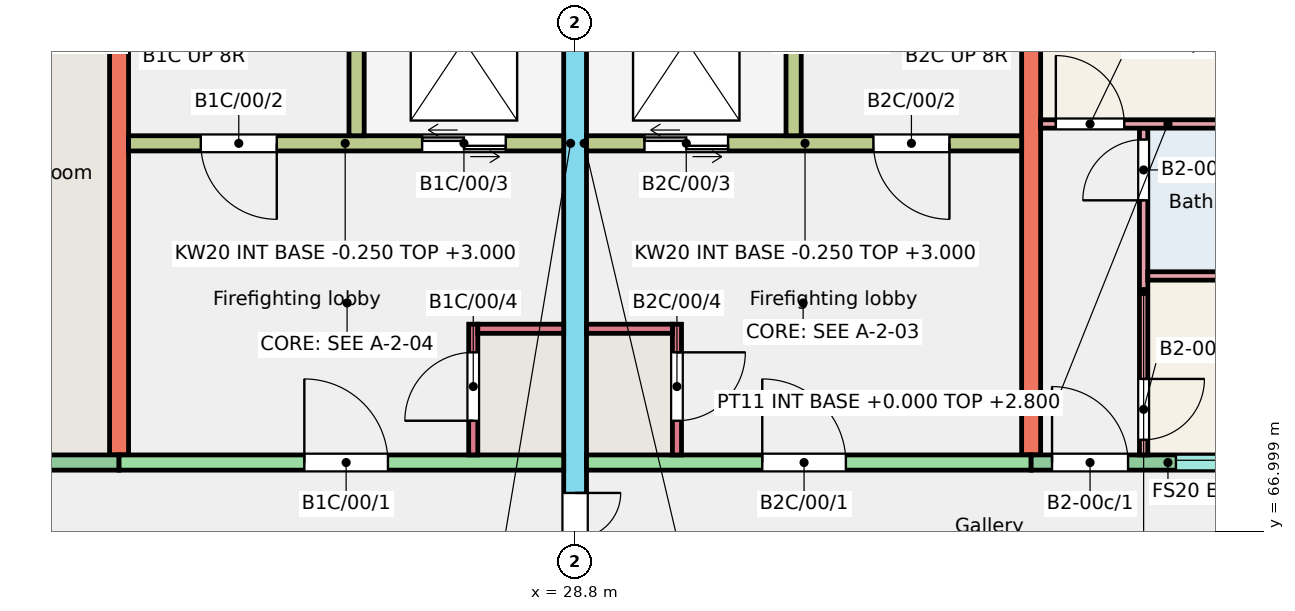
"""IFC4 building model, lengths in metres.
Left out: names, types, materials, properties, quantities, classifications, styles, units other than length and angle.
Written with IfcOpenShell. Run it as: python <this file> out.ifc"""

import sys

from ifc_helpers import new_model, si_unit, direction, frame, frame_2d, origin, place, context, subcontext, project, spatial, rectangle, extrude, element, fill, save


model = new_model("IFC4")
c1 = context("Model", 3, precision=1e-05, world=origin(), true_north=direction((0.0, 1.0)))
c2 = subcontext(c1, "Body", "Model", "MODEL_VIEW")
j1 = project(units=[si_unit("LENGTHUNIT", "METRE"), si_unit("PLANEANGLEUNIT", "RADIAN")], contexts=[c1])
p1 = place(None, origin())
s1 = spatial("IfcSite", under=j1, at=p1, CompositionType="ELEMENT")
p2 = place(p1, origin())
s2 = spatial("IfcBuilding", under=s1, at=p2, CompositionType="ELEMENT")
p3 = place(p2, origin())
s3 = spatial("IfcBuildingStorey", under=s2, at=p3, CompositionType="ELEMENT", Elevation=0.0)
p4 = place(p3, frame((22.8, 68.0, -0.25), z_axis=(0.0, 0.0, 1.0), x_axis=(0.0, 1.0, 0.0)))
e1 = element("IfcWall", 1, at=p4, inside=s3, PredefinedType="SHEAR", context=c2, shape_type="SweptSolid", body=[
    extrude(rectangle(XDim=9.0, YDim=0.25, at=frame_2d((4.5, 0.0))), origin(), (0.0, 0.0, 1.0), 3.25),
])
p5 = place(p3, frame((28.8, 66.0, -0.25), z_axis=(0.0, 0.0, 1.0), x_axis=(0.0, 1.0, 0.0)))
e2 = element("IfcWall", 2, at=p5, inside=s3, PredefinedType="SHEAR", context=c2, shape_type="SweptSolid", body=[
    extrude(rectangle(XDim=11.0, YDim=0.3, at=frame_2d((5.5, 0.0))), origin(), (0.0, 0.0, 1.0), 3.25),
])
p6 = place(p5, frame((0.3, 0.0, 0.25)))
e3 = element("IfcOpeningElement", 3, at=p6, cuts=e2, PredefinedType="OPENING", context=c2, shape_type="SweptSolid", body=[
    extrude(rectangle(XDim=1.2, YDim=2.1, at=frame_2d((0.6, 1.05))), frame((0.0, 0.16, 0.0), z_axis=(0.0, -1.0, 0.0), x_axis=(1.0, 0.0, 0.0)), (0.0, 0.0, 1.0), 0.32),
])
p7 = place(p3, frame((34.8, 68.0, -0.25), z_axis=(0.0, 0.0, 1.0), x_axis=(0.0, 1.0, 0.0)))
e4 = element("IfcWall", 4, at=p7, inside=s3, PredefinedType="SHEAR", context=c2, shape_type="SweptSolid", body=[
    extrude(rectangle(XDim=9.0, YDim=0.25, at=frame_2d((4.5, 0.0))), origin(), (0.0, 0.0, 1.0), 3.25),
])
p8 = place(p3, frame((19.2, 67.9, -0.25), z_axis=(0.0, 0.0, 1.0), x_axis=(1.0, 0.0, 0.0)))
e5 = element("IfcWall", 5, at=p8, inside=s3, PredefinedType="SOLIDWALL", context=c2, shape_type="SweptSolid", body=[
    extrude(rectangle(XDim=3.6, YDim=0.2, at=frame_2d((1.8, 0.0))), origin(), (0.0, 0.0, 1.0), 3.25),
])
p9 = place(p8, frame((1.288, 0.0, 0.25)))
e6 = element("IfcOpeningElement", 6, at=p9, cuts=e5, PredefinedType="OPENING", context=c2, shape_type="SweptSolid", body=[
    extrude(rectangle(XDim=1.0, YDim=2.1, at=frame_2d((0.5, 1.05))), frame((0.0, 0.11, 0.0), z_axis=(0.0, -1.0, 0.0), x_axis=(1.0, 0.0, 0.0)), (0.0, 0.0, 1.0), 0.22),
])
p10 = place(p3, frame((22.8, 67.9, -0.25), z_axis=(0.0, 0.0, 1.0), x_axis=(1.0, 0.0, 0.0)))
e7 = element("IfcWall", 7, at=p10, inside=s3, PredefinedType="SHEAR", context=c2, shape_type="SweptSolid", body=[
    extrude(rectangle(XDim=5.85, YDim=0.2, at=frame_2d((2.925, 0.0))), origin(), (0.0, 0.0, 1.0), 3.25),
])
p11 = place(p10, frame((2.438, 0.0, 0.25)))
e8 = element("IfcOpeningElement", 8, at=p11, cuts=e7, PredefinedType="OPENING", context=c2, shape_type="SweptSolid", body=[
    extrude(rectangle(XDim=1.1, YDim=2.1, at=frame_2d((0.55, 1.05))), frame((0.0, 0.11, 0.0), z_axis=(0.0, -1.0, 0.0), x_axis=(1.0, 0.0, 0.0)), (0.0, 0.0, 1.0), 0.22),
])
p12 = place(p3, frame((22.925, 72.1, -0.25), z_axis=(0.0, 0.0, 1.0), x_axis=(1.0, 0.0, 0.0)))
e9 = element("IfcWall", 9, at=p12, inside=s3, PredefinedType="SHEAR", context=c2, shape_type="SweptSolid", body=[
    extrude(rectangle(XDim=5.725, YDim=0.2, at=frame_2d((2.862, 0.0))), origin(), (0.0, 0.0, 1.0), 3.25),
])
p13 = place(p12, frame((0.95, 0.0, 0.25)))
e10 = element("IfcOpeningElement", 10, at=p13, cuts=e9, PredefinedType="OPENING", context=c2, shape_type="SweptSolid", body=[
    extrude(rectangle(XDim=1.0, YDim=2.1, at=frame_2d((0.5, 1.05))), frame((0.0, 0.11, 0.0), z_axis=(0.0, -1.0, 0.0), x_axis=(1.0, 0.0, 0.0)), (0.0, 0.0, 1.0), 0.22),
])
p14 = place(p12, frame((3.863, 0.0, 0.25)))
e11 = element("IfcOpeningElement", 11, at=p14, cuts=e9, PredefinedType="OPENING", context=c2, shape_type="SweptSolid", body=[
    extrude(rectangle(XDim=1.1, YDim=2.1, at=frame_2d((0.55, 1.05))), frame((0.0, 0.11, 0.0), z_axis=(0.0, -1.0, 0.0), x_axis=(1.0, 0.0, 0.0)), (0.0, 0.0, 1.0), 0.22),
])
p15 = place(p3, frame((25.925, 72.2, -0.25), z_axis=(0.0, 0.0, 1.0), x_axis=(0.0, 1.0, 0.0)))
e12 = element("IfcWall", 12, at=p15, inside=s3, PredefinedType="SHEAR", context=c2, shape_type="SweptSolid", body=[
    extrude(rectangle(XDim=4.8, YDim=0.2, at=frame_2d((2.4, 0.0))), origin(), (0.0, 0.0, 1.0), 3.25),
])
p16 = place(p3, frame((27.46, 68.0, -0.25), z_axis=(0.0, 0.0, 1.0), x_axis=(0.0, 1.0, 0.0)))
e13 = element("IfcWall", 13, at=p16, inside=s3, PredefinedType="SHEAR", context=c2, shape_type="SweptSolid", body=[
    extrude(rectangle(XDim=1.72, YDim=0.12, at=frame_2d((0.86, 0.0))), origin(), (0.0, 0.0, 1.0), 3.25),
])
p17 = place(p16, frame((0.45, 0.0, 0.25)))
e14 = element("IfcOpeningElement", 14, at=p17, cuts=e13, PredefinedType="OPENING", context=c2, shape_type="SweptSolid", body=[
    extrude(rectangle(XDim=0.9, YDim=2.1, at=frame_2d((0.45, 1.05))), frame((0.0, 0.07, 0.0), z_axis=(0.0, -1.0, 0.0), x_axis=(1.0, 0.0, 0.0)), (0.0, 0.0, 1.0), 0.14),
])
p18 = place(p3, frame((27.52, 69.66, -0.25), z_axis=(0.0, 0.0, 1.0), x_axis=(1.0, 0.0, 0.0)))
e15 = element("IfcWall", 15, at=p18, inside=s3, PredefinedType="SHEAR", context=c2, shape_type="SweptSolid", body=[
    extrude(rectangle(XDim=1.13, YDim=0.12, at=frame_2d((0.565, 0.0))), origin(), (0.0, 0.0, 1.0), 3.25),
])
p19 = place(p3, frame((28.95, 67.9, -0.25), z_axis=(0.0, 0.0, 1.0), x_axis=(1.0, 0.0, 0.0)))
e16 = element("IfcWall", 16, at=p19, inside=s3, PredefinedType="SHEAR", context=c2, shape_type="SweptSolid", body=[
    extrude(rectangle(XDim=5.85, YDim=0.2, at=frame_2d((2.925, 0.0))), origin(), (0.0, 0.0, 1.0), 3.25),
])
p20 = place(p19, frame((2.312, 0.0, 0.25)))
e17 = element("IfcOpeningElement", 17, at=p20, cuts=e16, PredefinedType="OPENING", context=c2, shape_type="SweptSolid", body=[
    extrude(rectangle(XDim=1.1, YDim=2.1, at=frame_2d((0.55, 1.05))), frame((0.0, 0.11, 0.0), z_axis=(0.0, -1.0, 0.0), x_axis=(1.0, 0.0, 0.0)), (0.0, 0.0, 1.0), 0.22),
])
p21 = place(p3, frame((28.95, 72.1, -0.25), z_axis=(0.0, 0.0, 1.0), x_axis=(1.0, 0.0, 0.0)))
e18 = element("IfcWall", 18, at=p21, inside=s3, PredefinedType="SHEAR", context=c2, shape_type="SweptSolid", body=[
    extrude(rectangle(XDim=5.725, YDim=0.2, at=frame_2d((2.863, 0.0))), origin(), (0.0, 0.0, 1.0), 3.25),
])
p22 = place(p21, frame((3.775, 0.0, 0.25)))
e19 = element("IfcOpeningElement", 19, at=p22, cuts=e18, PredefinedType="OPENING", context=c2, shape_type="SweptSolid", body=[
    extrude(rectangle(XDim=1.0, YDim=2.1, at=frame_2d((0.5, 1.05))), frame((0.0, 0.11, 0.0), z_axis=(0.0, -1.0, 0.0), x_axis=(1.0, 0.0, 0.0)), (0.0, 0.0, 1.0), 0.22),
])
p23 = place(p21, frame((0.762, 0.0, 0.25)))
e20 = element("IfcOpeningElement", 20, at=p23, cuts=e18, PredefinedType="OPENING", context=c2, shape_type="SweptSolid", body=[
    extrude(rectangle(XDim=1.1, YDim=2.1, at=frame_2d((0.55, 1.05))), frame((0.0, 0.11, 0.0), z_axis=(0.0, -1.0, 0.0), x_axis=(1.0, 0.0, 0.0)), (0.0, 0.0, 1.0), 0.22),
])
p24 = place(p3, frame((31.675, 72.2, -0.25), z_axis=(0.0, 0.0, 1.0), x_axis=(0.0, 1.0, 0.0)))
e21 = element("IfcWall", 21, at=p24, inside=s3, PredefinedType="SHEAR", context=c2, shape_type="SweptSolid", body=[
    extrude(rectangle(XDim=4.8, YDim=0.2, at=frame_2d((2.4, 0.0))), origin(), (0.0, 0.0, 1.0), 3.25),
])
p25 = place(p3, frame((30.14, 68.0, -0.25), z_axis=(0.0, 0.0, 1.0), x_axis=(0.0, 1.0, 0.0)))
e22 = element("IfcWall", 22, at=p25, inside=s3, PredefinedType="SHEAR", context=c2, shape_type="SweptSolid", body=[
    extrude(rectangle(XDim=1.72, YDim=0.12, at=frame_2d((0.86, 0.0))), origin(), (0.0, 0.0, 1.0), 3.25),
])
p26 = place(p25, frame((0.45, 0.0, 0.25)))
e23 = element("IfcOpeningElement", 23, at=p26, cuts=e22, PredefinedType="OPENING", context=c2, shape_type="SweptSolid", body=[
    extrude(rectangle(XDim=0.9, YDim=2.1, at=frame_2d((0.45, 1.05))), frame((0.0, 0.07, 0.0), z_axis=(0.0, -1.0, 0.0), x_axis=(1.0, 0.0, 0.0)), (0.0, 0.0, 1.0), 0.14),
])
p27 = place(p3, frame((28.95, 69.66, -0.25), z_axis=(0.0, 0.0, 1.0), x_axis=(1.0, 0.0, 0.0)))
e24 = element("IfcWall", 24, at=p27, inside=s3, PredefinedType="SHEAR", context=c2, shape_type="SweptSolid", body=[
    extrude(rectangle(XDim=1.13, YDim=0.12, at=frame_2d((0.565, 0.0))), origin(), (0.0, 0.0, 1.0), 3.25),
])
p28 = place(p3, frame((34.8, 67.9, -0.25), z_axis=(0.0, 0.0, 1.0), x_axis=(1.0, 0.0, 0.0)))
e25 = element("IfcWall", 25, at=p28, inside=s3, PredefinedType="SOLIDWALL", context=c2, shape_type="SweptSolid", body=[
    extrude(rectangle(XDim=3.6, YDim=0.2, at=frame_2d((1.8, 0.0))), origin(), (0.0, 0.0, 1.0), 3.25),
])
p29 = place(p28, frame((1.905, 0.0, 1.35)))
e26 = element("IfcOpeningElement", 26, at=p29, cuts=e25, PredefinedType="OPENING", context=c2, shape_type="SweptSolid", body=[
    extrude(rectangle(XDim=1.2, YDim=1.3, at=frame_2d((0.6, 0.65))), frame((0.0, 0.11, 0.0), z_axis=(0.0, -1.0, 0.0), x_axis=(1.0, 0.0, 0.0)), (0.0, 0.0, 1.0), 0.22),
])
p30 = place(p28, frame((0.275, 0.0, 0.25)))
e27 = element("IfcOpeningElement", 27, at=p30, cuts=e25, PredefinedType="OPENING", context=c2, shape_type="SweptSolid", body=[
    extrude(rectangle(XDim=1.0, YDim=2.1, at=frame_2d((0.5, 1.05))), frame((0.0, 0.11, 0.0), z_axis=(0.0, -1.0, 0.0), x_axis=(1.0, 0.0, 0.0)), (0.0, 0.0, 1.0), 0.22),
])
p31 = place(p3, frame((25.825, 72.1, -1.4), z_axis=(0.0, 0.0, 1.0), x_axis=(1.0, 0.0, 0.0)))
e28 = element("IfcWall", 28, at=p31, inside=s3, PredefinedType="SHEAR", context=c2, shape_type="SweptSolid", body=[
    extrude(rectangle(XDim=2.975, YDim=0.2, at=frame_2d((1.488, 0.0))), origin(), (0.0, 0.0, 1.0), 1.15),
])
p32 = place(p3, frame((25.925, 72.2, -1.4), z_axis=(0.0, 0.0, 1.0), x_axis=(0.0, 1.0, 0.0)))
e29 = element("IfcWall", 29, at=p32, inside=s3, PredefinedType="SHEAR", context=c2, shape_type="SweptSolid", body=[
    extrude(rectangle(XDim=3.0, YDim=0.2, at=frame_2d((1.5, 0.0))), origin(), (0.0, 0.0, 1.0), 1.15),
])
p33 = place(p3, frame((28.725, 72.2, -1.4), z_axis=(0.0, 0.0, 1.0), x_axis=(0.0, 1.0, 0.0)))
e30 = element("IfcWall", 30, at=p33, inside=s3, PredefinedType="SHEAR", context=c2, shape_type="SweptSolid", body=[
    extrude(rectangle(XDim=3.0, YDim=0.15, at=frame_2d((1.5, 0.0))), origin(), (0.0, 0.0, 1.0), 1.15),
])
p34 = place(p3, frame((28.8, 72.1, -1.4), z_axis=(0.0, 0.0, 1.0), x_axis=(1.0, 0.0, 0.0)))
e31 = element("IfcWall", 31, at=p34, inside=s3, PredefinedType="SHEAR", context=c2, shape_type="SweptSolid", body=[
    extrude(rectangle(XDim=2.975, YDim=0.2, at=frame_2d((1.487, 0.0))), origin(), (0.0, 0.0, 1.0), 1.15),
])
p35 = place(p3, frame((31.675, 72.2, -1.4), z_axis=(0.0, 0.0, 1.0), x_axis=(0.0, 1.0, 0.0)))
e32 = element("IfcWall", 32, at=p35, inside=s3, PredefinedType="SHEAR", context=c2, shape_type="SweptSolid", body=[
    extrude(rectangle(XDim=3.0, YDim=0.2, at=frame_2d((1.5, 0.0))), origin(), (0.0, 0.0, 1.0), 1.15),
])
p36 = place(p3, frame((28.875, 72.2, -1.4), z_axis=(0.0, 0.0, 1.0), x_axis=(0.0, 1.0, 0.0)))
e33 = element("IfcWall", 33, at=p36, inside=s3, PredefinedType="SHEAR", context=c2, shape_type="SweptSolid", body=[
    extrude(rectangle(XDim=3.0, YDim=0.15, at=frame_2d((1.5, 0.0))), origin(), (0.0, 0.0, 1.0), 1.15),
])
p37 = place(p3, frame((36.28, 68.0, 0.0), z_axis=(0.0, 0.0, 1.0), x_axis=(0.0, 1.0, 0.0)))
e34 = element("IfcWall", 34, at=p37, inside=s3, PredefinedType="PARTITIONING", context=c2, shape_type="SweptSolid", body=[
    extrude(rectangle(XDim=4.3, YDim=0.11, at=frame_2d((2.15, 0.0))), origin(), (0.0, 0.0, 1.0), 2.8),
])
p38 = place(p37, frame((0.2, 0.0, 0.0)))
e35 = element("IfcOpeningElement", 35, at=p38, cuts=e34, PredefinedType="OPENING", context=c2, shape_type="SweptSolid", body=[
    extrude(rectangle(XDim=0.8, YDim=2.1, at=frame_2d((0.4, 1.05))), frame((0.0, 0.065, 0.0), z_axis=(0.0, -1.0, 0.0), x_axis=(1.0, 0.0, 0.0)), (0.0, 0.0, 1.0), 0.13),
])
p39 = place(p37, frame((3.35, 0.0, 0.0)))
e36 = element("IfcOpeningElement", 36, at=p39, cuts=e34, PredefinedType="OPENING", context=c2, shape_type="SweptSolid", body=[
    extrude(rectangle(XDim=0.8, YDim=2.1, at=frame_2d((0.4, 1.05))), frame((0.0, 0.065, 0.0), z_axis=(0.0, -1.0, 0.0), x_axis=(1.0, 0.0, 0.0)), (0.0, 0.0, 1.0), 0.13),
])
p40 = place(p3, frame((36.335, 70.355, 0.0), z_axis=(0.0, 0.0, 1.0), x_axis=(1.0, 0.0, 0.0)))
e37 = element("IfcWall", 37, at=p40, inside=s3, PredefinedType="PARTITIONING", context=c2, shape_type="SweptSolid", body=[
    extrude(rectangle(XDim=1.94, YDim=0.11, at=frame_2d((0.97, 0.0))), origin(), (0.0, 0.0, 1.0), 2.8),
])
p41 = place(p3, frame((34.925, 72.355, 0.0), z_axis=(0.0, 0.0, 1.0), x_axis=(1.0, 0.0, 0.0)))
e38 = element("IfcWall", 38, at=p41, inside=s3, PredefinedType="PARTITIONING", context=c2, shape_type="SweptSolid", body=[
    extrude(rectangle(XDim=3.35, YDim=0.11, at=frame_2d((1.675, 0.0))), origin(), (0.0, 0.0, 1.0), 2.8),
])
p42 = place(p41, frame((0.2, 0.0, 0.0)))
e39 = element("IfcOpeningElement", 39, at=p42, cuts=e38, PredefinedType="OPENING", context=c2, shape_type="SweptSolid", body=[
    extrude(rectangle(XDim=0.9, YDim=2.1, at=frame_2d((0.45, 1.05))), frame((0.0, 0.065, 0.0), z_axis=(0.0, -1.0, 0.0), x_axis=(1.0, 0.0, 0.0)), (0.0, 0.0, 1.0), 0.13),
])
p43 = place(p29, origin())
e40 = element("IfcWindow", 40, at=p43, inside=s3, PartitioningType="SINGLE_PANEL", PredefinedType="WINDOW", context=c2, shape_type="SweptSolid", body=[
    extrude(rectangle(XDim=1.2, YDim=1.3, at=frame_2d((0.6, 0.65))), frame((0.0, 0.06, 0.0), z_axis=(0.0, -1.0, 0.0), x_axis=(1.0, 0.0, 0.0)), (0.0, 0.0, 1.0), 0.06),
])
fill(e26, e40)
p44 = place(p30, origin())
e41 = element("IfcDoor", 41, at=p44, inside=s3, OperationType="SINGLE_SWING_LEFT", PredefinedType="DOOR", context=c2, shape_type="SweptSolid", body=[
    extrude(rectangle(XDim=1.0, YDim=2.1, at=frame_2d((0.5, 1.05))), frame((0.0, 0.025, 0.0), z_axis=(0.0, -1.0, 0.0), x_axis=(1.0, 0.0, 0.0)), (0.0, 0.0, 1.0), 0.05),
])
fill(e27, e41)
p45 = place(p38, origin())
e42 = element("IfcDoor", 42, at=p45, inside=s3, OperationType="SINGLE_SWING_RIGHT", PredefinedType="DOOR", context=c2, shape_type="SweptSolid", body=[
    extrude(rectangle(XDim=0.8, YDim=2.1, at=frame_2d((0.4, 1.05))), frame((0.0, 0.025, 0.0), z_axis=(0.0, -1.0, 0.0), x_axis=(1.0, 0.0, 0.0)), (0.0, 0.0, 1.0), 0.05),
])
fill(e35, e42)
p46 = place(p39, origin())
e43 = element("IfcDoor", 43, at=p46, inside=s3, OperationType="SINGLE_SWING_LEFT", PredefinedType="DOOR", context=c2, shape_type="SweptSolid", body=[
    extrude(rectangle(XDim=0.8, YDim=2.1, at=frame_2d((0.4, 1.05))), frame((0.0, 0.025, 0.0), z_axis=(0.0, -1.0, 0.0), x_axis=(1.0, 0.0, 0.0)), (0.0, 0.0, 1.0), 0.05),
])
fill(e36, e43)
p47 = place(p42, origin())
e44 = element("IfcDoor", 44, at=p47, inside=s3, OperationType="SINGLE_SWING_LEFT", PredefinedType="DOOR", context=c2, shape_type="SweptSolid", body=[
    extrude(rectangle(XDim=0.9, YDim=2.1, at=frame_2d((0.45, 1.05))), frame((0.0, 0.025, 0.0), z_axis=(0.0, -1.0, 0.0), x_axis=(1.0, 0.0, 0.0)), (0.0, 0.0, 1.0), 0.05),
])
fill(e39, e44)
p48 = place(p11, origin())
e45 = element("IfcDoor", 45, at=p48, inside=s3, OperationType="SINGLE_SWING_LEFT", PredefinedType="DOOR", context=c2, shape_type="SweptSolid", body=[
    extrude(rectangle(XDim=1.1, YDim=2.1, at=frame_2d((0.55, 1.05))), frame((0.0, 0.025, 0.0), z_axis=(0.0, -1.0, 0.0), x_axis=(1.0, 0.0, 0.0)), (0.0, 0.0, 1.0), 0.05),
])
fill(e8, e45)
p49 = place(p13, origin())
e46 = element("IfcDoor", 46, at=p49, inside=s3, OperationType="SINGLE_SWING_RIGHT", PredefinedType="DOOR", context=c2, shape_type="SweptSolid", body=[
    extrude(rectangle(XDim=1.0, YDim=2.1, at=frame_2d((0.5, 1.05))), frame((0.0, 0.025, 0.0), z_axis=(0.0, -1.0, 0.0), x_axis=(1.0, 0.0, 0.0)), (0.0, 0.0, 1.0), 0.05),
])
fill(e10, e46)
p50 = place(p14, origin())
e47 = element("IfcDoor", 47, at=p50, inside=s3, OperationType="DOUBLE_DOOR_SLIDING", PredefinedType="DOOR", context=c2, shape_type="SweptSolid", body=[
    extrude(rectangle(XDim=1.1, YDim=2.1, at=frame_2d((0.55, 1.05))), frame((0.0, 0.025, 0.0), z_axis=(0.0, -1.0, 0.0), x_axis=(1.0, 0.0, 0.0)), (0.0, 0.0, 1.0), 0.05),
])
fill(e11, e47)
p51 = place(p17, origin())
e48 = element("IfcDoor", 48, at=p51, inside=s3, OperationType="SINGLE_SWING_LEFT", PredefinedType="DOOR", context=c2, shape_type="SweptSolid", body=[
    extrude(rectangle(XDim=0.9, YDim=2.1, at=frame_2d((0.45, 1.05))), frame((0.0, 0.025, 0.0), z_axis=(0.0, -1.0, 0.0), x_axis=(1.0, 0.0, 0.0)), (0.0, 0.0, 1.0), 0.05),
])
fill(e14, e48)
p52 = place(p20, origin())
e49 = element("IfcDoor", 49, at=p52, inside=s3, OperationType="SINGLE_SWING_LEFT", PredefinedType="DOOR", context=c2, shape_type="SweptSolid", body=[
    extrude(rectangle(XDim=1.1, YDim=2.1, at=frame_2d((0.55, 1.05))), frame((0.0, 0.025, 0.0), z_axis=(0.0, -1.0, 0.0), x_axis=(1.0, 0.0, 0.0)), (0.0, 0.0, 1.0), 0.05),
])
fill(e17, e49)
p53 = place(p22, origin())
e50 = element("IfcDoor", 50, at=p53, inside=s3, OperationType="SINGLE_SWING_RIGHT", PredefinedType="DOOR", context=c2, shape_type="SweptSolid", body=[
    extrude(rectangle(XDim=1.0, YDim=2.1, at=frame_2d((0.5, 1.05))), frame((0.0, 0.025, 0.0), z_axis=(0.0, -1.0, 0.0), x_axis=(1.0, 0.0, 0.0)), (0.0, 0.0, 1.0), 0.05),
])
fill(e19, e50)
p54 = place(p23, origin())
e51 = element("IfcDoor", 51, at=p54, inside=s3, OperationType="DOUBLE_DOOR_SLIDING", PredefinedType="DOOR", context=c2, shape_type="SweptSolid", body=[
    extrude(rectangle(XDim=1.1, YDim=2.1, at=frame_2d((0.55, 1.05))), frame((0.0, 0.025, 0.0), z_axis=(0.0, -1.0, 0.0), x_axis=(1.0, 0.0, 0.0)), (0.0, 0.0, 1.0), 0.05),
])
fill(e20, e51)
p55 = place(p26, origin())
e52 = element("IfcDoor", 52, at=p55, inside=s3, OperationType="SINGLE_SWING_RIGHT", PredefinedType="DOOR", context=c2, shape_type="SweptSolid", body=[
    extrude(rectangle(XDim=0.9, YDim=2.1, at=frame_2d((0.45, 1.05))), frame((0.0, 0.025, 0.0), z_axis=(0.0, -1.0, 0.0), x_axis=(1.0, 0.0, 0.0)), (0.0, 0.0, 1.0), 0.05),
])
fill(e23, e52)
p56 = place(p6, origin())
e53 = element("IfcDoor", 53, at=p56, inside=s3, OperationType="DOUBLE_DOOR_SINGLE_SWING", PredefinedType="DOOR", context=c2, shape_type="SweptSolid", body=[
    extrude(rectangle(XDim=1.2, YDim=2.1, at=frame_2d((0.6, 1.05))), frame((0.0, 0.025, 0.0), z_axis=(0.0, -1.0, 0.0), x_axis=(1.0, 0.0, 0.0)), (0.0, 0.0, 1.0), 0.05),
])
fill(e3, e53)
save(model, sys.argv[1])
